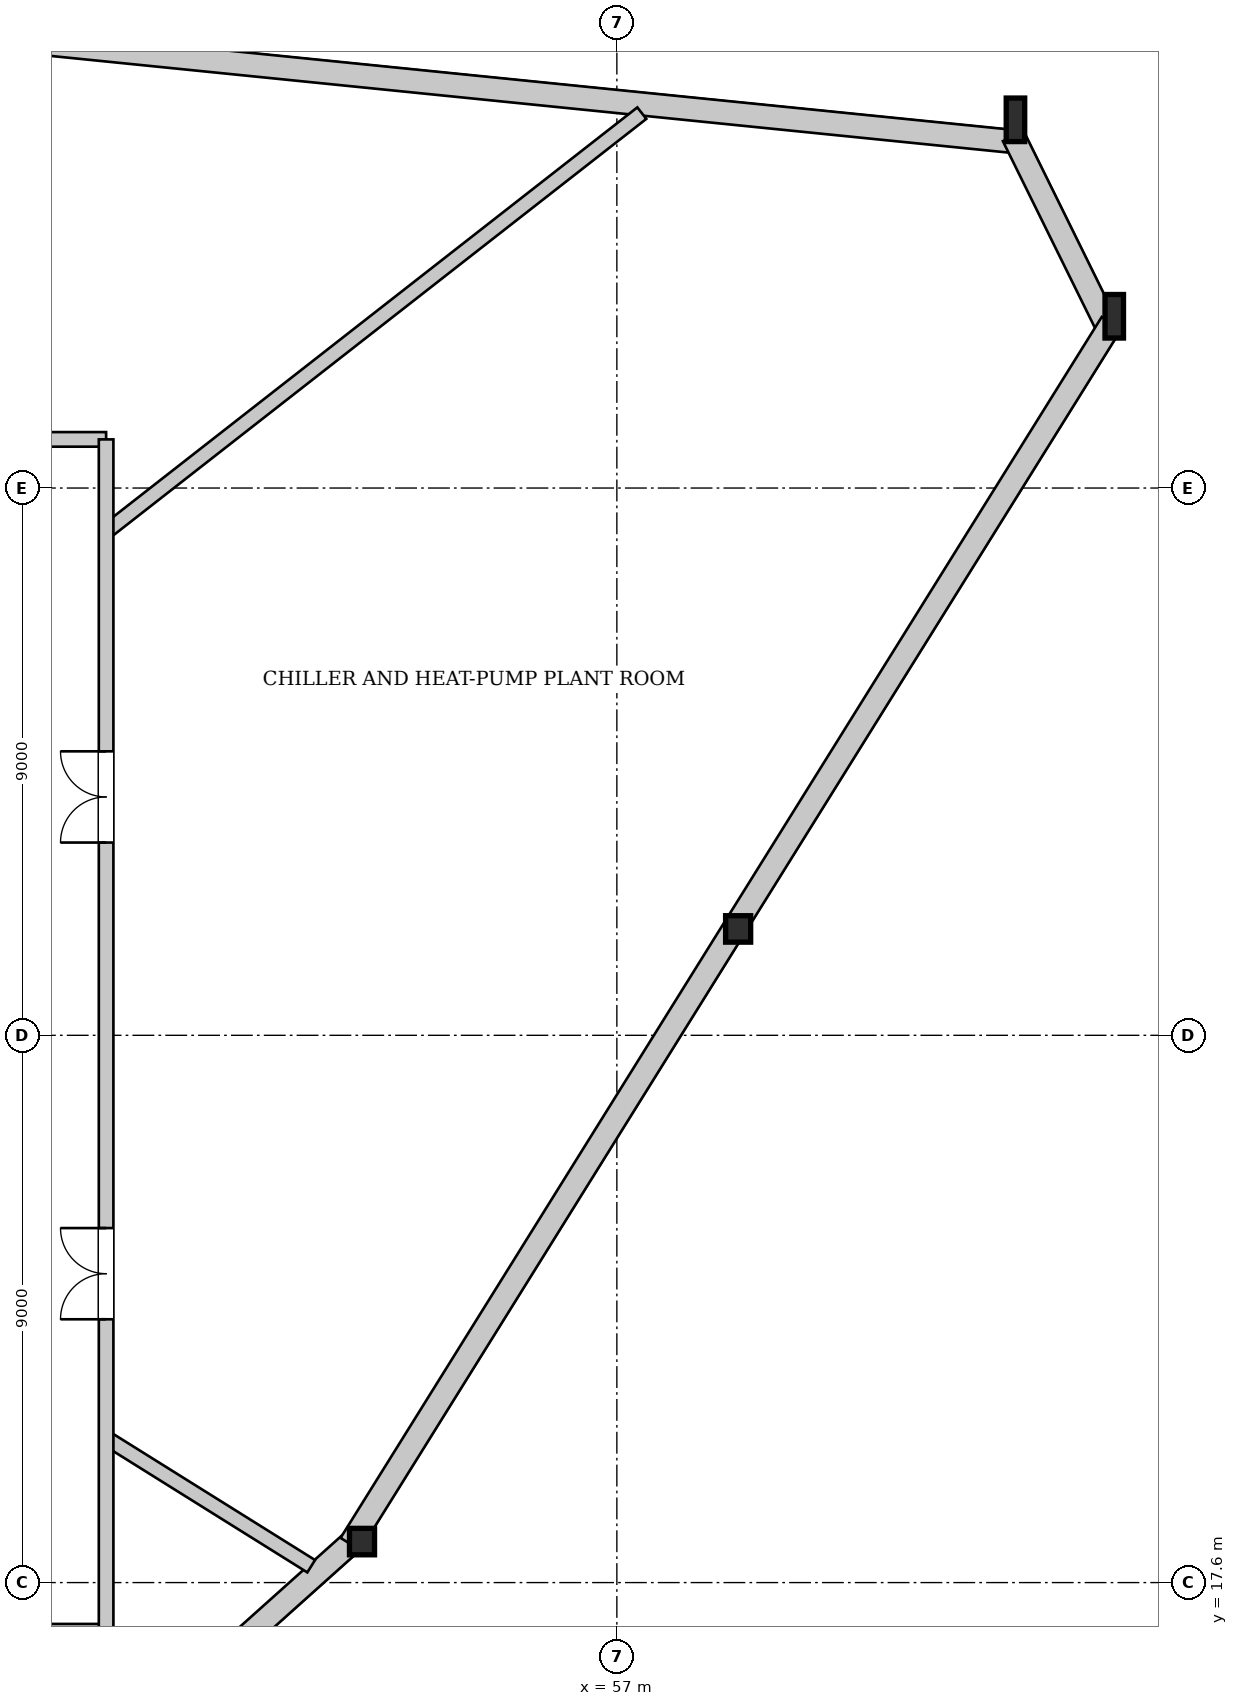
"""IFC4 building model, lengths in metres.
Left out: names, types, materials, properties, quantities, classifications, styles, units other than length and angle.
Written with IfcOpenShell. Run it as: python <this file> out.ifc"""

import sys

from ifc_helpers import new_model, si_unit, direction, frame, frame_2d, origin, origin_2d, place, context, subcontext, project, spatial, rectangle, i_section, extrude, source, transform, mapped, element, fill, save


model = new_model("IFC4")
c1 = context("Model", 3, precision=1e-05, world=origin(), true_north=direction((0.0, 1.0)))
c2 = subcontext(c1, "Body", "Model", "MODEL_VIEW")
j1 = project(units=[si_unit("LENGTHUNIT", "METRE"), si_unit("PLANEANGLEUNIT", "RADIAN")], contexts=[c1])
p1 = place(None, origin())
s1 = spatial("IfcSite", under=j1, at=p1, CompositionType="ELEMENT")
p2 = place(p1, origin())
s2 = spatial("IfcBuilding", under=s1, at=p2, CompositionType="ELEMENT")
p3 = place(p2, frame((0.0, 0.0, 142.1)))
s3 = spatial("IfcBuildingStorey", under=s2, at=p3, CompositionType="ELEMENT", Elevation=142.1)
m1 = source(origin(), c2, "Body", "SweptSolid", [
    extrude(i_section(OverallWidth=0.304, OverallDepth=0.716, WebThickness=0.021, FlangeThickness=0.04, at=origin_2d()), origin(), (0.0, 0.0, 1.0), 4.362),
])
p4 = place(p3, frame((65.297, 38.213, 0.0), z_axis=(-0.053564206709, 0.097221553869, 0.993820328441), x_axis=(-0.875864353367, -0.482557389852, 0.0)))
e1 = element("IfcColumn", 1, at=p4, inside=s3, PredefinedType="COLUMN", context=c2, shape_type="MappedRepresentation", body=[
    mapped(m1, transform((0.0, 0.0, 0.0), x_axis=(1.0, 0.0, 0.0), y_axis=(0.0, 1.0, 0.0), z_axis=(0.0, 0.0, 1.0), scale=1.0)),
])
m2 = source(origin(), c2, "Body", "SweptSolid", [
    extrude(i_section(OverallWidth=0.304, OverallDepth=0.716, WebThickness=0.021, FlangeThickness=0.04, at=origin_2d()), origin(), (0.0, 0.0, 1.0), 4.358),
])
p5 = place(p3, frame((63.689, 41.473, 0.0), z_axis=(-0.061281500187, 0.083519850803, 0.994620034112), x_axis=(-0.806250246525, -0.591574627564, 0.0)))
e2 = element("IfcColumn", 2, at=p5, inside=s3, PredefinedType="COLUMN", context=c2, shape_type="MappedRepresentation", body=[
    mapped(m2, transform((0.0, 0.0, 0.0), x_axis=(1.0, 0.0, 0.0), y_axis=(0.0, 1.0, 0.0), z_axis=(0.0, 0.0, 1.0), scale=1.0)),
])
m3 = source(origin(), c2, "Body", "SweptSolid", [
    extrude(i_section(OverallWidth=0.412, OverallDepth=0.435, WebThickness=0.031, FlangeThickness=0.05, at=origin_2d()), origin(), (0.0, 0.0, 1.0), 4.344),
])
p6 = place(p3, frame((52.779, 18.134, 0.0), z_axis=(0.013824133478, 0.06468120989, 0.997810219641), x_axis=(-0.977914175981, 0.209006852555, 0.0)))
e3 = element("IfcColumn", 3, at=p6, inside=s3, PredefinedType="COLUMN", context=c2, shape_type="MappedRepresentation", body=[
    mapped(m3, transform((0.0, 0.0, 0.0), x_axis=(1.0, 0.0, 0.0), y_axis=(0.0, 1.0, 0.0), z_axis=(0.0, 0.0, 1.0), scale=1.0)),
])
m4 = source(origin(), c2, "Body", "SweptSolid", [
    extrude(i_section(OverallWidth=0.412, OverallDepth=0.435, WebThickness=0.031, FlangeThickness=0.05, at=origin_2d()), origin(), (0.0, 0.0, 1.0), 4.35),
])
p7 = place(p3, frame((59.038, 28.173, 0.0), z_axis=(-0.019923497825, 0.081040931997, 0.996511626413), x_axis=(-0.971084473571, -0.238736141356, 0.0)))
e4 = element("IfcColumn", 4, at=p7, inside=s3, PredefinedType="COLUMN", context=c2, shape_type="MappedRepresentation", body=[
    mapped(m4, transform((0.0, 0.0, 0.0), x_axis=(1.0, 0.0, 0.0), y_axis=(0.0, 1.0, 0.0), z_axis=(0.0, 0.0, 1.0), scale=1.0)),
])
p8 = place(p3, frame((52.652, 18.275, 0.0), z_axis=(0.0, 0.0, 1.0), x_axis=(-0.744998125176, -0.667066558511, 0.0)))
e5 = element("IfcWall", 5, at=p8, inside=s3, PredefinedType="SOLIDWALL", context=c2, shape_type="SweptSolid", body=[
    extrude(rectangle(XDim=23.662, YDim=0.38, at=frame_2d((11.831, 0.0))), origin(), (0.0, 0.0, 1.0), 3.642),
])
p9 = place(p3, frame((40.712, 43.601, 0.0), z_axis=(0.0, 0.0, 1.0), x_axis=(0.994945211236, -0.100419254326, 0.0)))
e6 = element("IfcWall", 6, at=p9, inside=s3, PredefinedType="SOLIDWALL", context=c2, shape_type="SweptSolid", body=[
    extrude(rectangle(XDim=23.075, YDim=0.38, at=frame_2d((11.537, 0.0))), origin(), (0.0, 0.0, 1.0), 3.642),
])
p10 = place(p3, frame((63.519, 41.389, 0.0), z_axis=(0.0, 0.0, 1.0), x_axis=(0.442318381108, -0.896858098995, 0.0)))
e7 = element("IfcWall", 7, at=p10, inside=s3, PredefinedType="SOLIDWALL", context=c2, shape_type="SweptSolid", body=[
    extrude(rectangle(XDim=3.636, YDim=0.38, at=frame_2d((1.818, 0.0))), origin(), (0.0, 0.0, 1.0), 3.642),
])
p11 = place(p3, frame((65.136, 38.313, 0.0), z_axis=(0.0, 0.0, 1.0), x_axis=(-0.529057237664, -0.84858614134, 0.0)))
e8 = element("IfcWall", 8, at=p11, inside=s3, PredefinedType="SOLIDWALL", context=c2, shape_type="SweptSolid", body=[
    extrude(rectangle(XDim=23.662, YDim=0.38, at=frame_2d((11.831, 0.0))), origin(), (0.0, 0.0, 1.0), 3.642),
])
p12 = place(p3, frame((48.6, 19.976, 0.0), z_axis=(0.0, 0.0, 1.0), x_axis=(0.84806382316, -0.529894094935, 0.0)))
e9 = element("IfcWall", 9, at=p12, inside=s3, PredefinedType="PARTITIONING", context=c2, shape_type="SweptSolid", body=[
    extrude(rectangle(XDim=3.977, YDim=0.24, at=frame_2d((1.989, 0.0))), origin(), (0.0, 0.0, 1.0), 4.25),
])
p13 = place(p3, frame((48.6, 34.882, 0.0), z_axis=(0.0, 0.0, 1.0), x_axis=(0.788011131686, 0.615660991406, 0.0)))
e10 = element("IfcWall", 10, at=p13, inside=s3, PredefinedType="PARTITIONING", context=c2, shape_type="SweptSolid", body=[
    extrude(rectangle(XDim=11.181, YDim=0.24, at=frame_2d((5.59, 0.0))), origin(), (0.0, 0.0, 1.0), 4.25),
])
p14 = place(p3, frame((27.4, 16.8, 0.0), z_axis=(0.0, 0.0, 1.0), x_axis=(1.0, 0.0, 0.0)))
e11 = element("IfcWall", 11, at=p14, inside=s3, PredefinedType="PARTITIONING", context=c2, shape_type="SweptSolid", body=[
    extrude(rectangle(XDim=21.2, YDim=0.24, at=frame_2d((10.6, 0.0))), origin(), (0.0, 0.0, 1.0), 4.25),
])
p15 = place(p14, frame((5.7, 0.0, 0.0)))
e12 = element("IfcOpeningElement", 12, at=p15, cuts=e11, PredefinedType="OPENING", context=c2, shape_type="SweptSolid", body=[
    extrude(rectangle(XDim=1.32, YDim=2.2, at=frame_2d((0.66, 1.1))), frame((0.0, 0.13, 0.0), z_axis=(0.0, -1.0, 0.0), x_axis=(1.0, 0.0, 0.0)), (0.0, 0.0, 1.0), 0.26),
])
p16 = place(p14, frame((14.18, 0.0, 0.0)))
e13 = element("IfcOpeningElement", 13, at=p16, cuts=e11, PredefinedType="OPENING", context=c2, shape_type="SweptSolid", body=[
    extrude(rectangle(XDim=1.5, YDim=2.25, at=frame_2d((0.75, 1.125))), frame((0.0, 0.13, 0.0), z_axis=(0.0, -1.0, 0.0), x_axis=(1.0, 0.0, 0.0)), (0.0, 0.0, 1.0), 0.26),
])
p17 = place(p3, frame((27.4, 36.4, 0.0), z_axis=(0.0, 0.0, 1.0), x_axis=(1.0, 0.0, 0.0)))
e14 = element("IfcWall", 14, at=p17, inside=s3, PredefinedType="PARTITIONING", context=c2, shape_type="SweptSolid", body=[
    extrude(rectangle(XDim=21.2, YDim=0.24, at=frame_2d((10.6, 0.0))), origin(), (0.0, 0.0, 1.0), 4.25),
])
p18 = place(p17, frame((4.81, 0.0, 0.0)))
e15 = element("IfcOpeningElement", 15, at=p18, cuts=e14, PredefinedType="OPENING", context=c2, shape_type="SweptSolid", body=[
    extrude(rectangle(XDim=1.5, YDim=2.25, at=frame_2d((0.75, 1.125))), frame((0.0, 0.13, 0.0), z_axis=(0.0, -1.0, 0.0), x_axis=(1.0, 0.0, 0.0)), (0.0, 0.0, 1.0), 0.26),
])
p19 = place(p17, frame((14.09, 0.0, 0.0)))
e16 = element("IfcOpeningElement", 16, at=p19, cuts=e14, PredefinedType="OPENING", context=c2, shape_type="SweptSolid", body=[
    extrude(rectangle(XDim=1.5, YDim=2.25, at=frame_2d((0.75, 1.125))), frame((0.0, 0.13, 0.0), z_axis=(0.0, -1.0, 0.0), x_axis=(1.0, 0.0, 0.0)), (0.0, 0.0, 1.0), 0.26),
])
p20 = place(p3, frame((48.6, 16.8, 0.0), z_axis=(0.0, 0.0, 1.0), x_axis=(0.0, 1.0, 0.0)))
e17 = element("IfcWall", 17, at=p20, inside=s3, PredefinedType="PARTITIONING", context=c2, shape_type="SweptSolid", body=[
    extrude(rectangle(XDim=19.6, YDim=0.24, at=frame_2d((9.8, 0.0))), origin(), (0.0, 0.0, 1.0), 4.25),
])
p21 = place(p20, frame((5.13, 0.0, 0.0)))
e18 = element("IfcOpeningElement", 18, at=p21, cuts=e17, PredefinedType="OPENING", context=c2, shape_type="SweptSolid", body=[
    extrude(rectangle(XDim=1.5, YDim=2.25, at=frame_2d((0.75, 1.125))), frame((0.0, 0.13, 0.0), z_axis=(0.0, -1.0, 0.0), x_axis=(1.0, 0.0, 0.0)), (0.0, 0.0, 1.0), 0.26),
])
p22 = place(p20, frame((12.97, 0.0, 0.0)))
e19 = element("IfcOpeningElement", 19, at=p22, cuts=e17, PredefinedType="OPENING", context=c2, shape_type="SweptSolid", body=[
    extrude(rectangle(XDim=1.5, YDim=2.25, at=frame_2d((0.75, 1.125))), frame((0.0, 0.13, 0.0), z_axis=(0.0, -1.0, 0.0), x_axis=(1.0, 0.0, 0.0)), (0.0, 0.0, 1.0), 0.26),
])
m5 = source(origin(), c2, "Body", "SweptSolid", [
    extrude(rectangle(XDim=1.5, YDim=2.25, at=frame_2d((0.75, 1.125))), frame((0.0, 0.025, 0.0), z_axis=(0.0, -1.0, 0.0), x_axis=(1.0, 0.0, 0.0)), (0.0, 0.0, 1.0), 0.05),
])
p23 = place(p21, origin())
e20 = element("IfcDoor", 20, at=p23, inside=s3, OperationType="DOUBLE_DOOR_SINGLE_SWING", PredefinedType="DOOR", context=c2, shape_type="MappedRepresentation", body=[
    mapped(m5, transform((0.0, 0.0, 0.0), x_axis=(1.0, 0.0, 0.0), y_axis=(0.0, 1.0, 0.0), z_axis=(0.0, 0.0, 1.0), scale=1.0)),
])
fill(e18, e20)
p24 = place(p22, origin())
e21 = element("IfcDoor", 21, at=p24, inside=s3, OperationType="DOUBLE_DOOR_SINGLE_SWING", PredefinedType="DOOR", context=c2, shape_type="MappedRepresentation", body=[
    mapped(m5, transform((0.0, 0.0, 0.0), x_axis=(1.0, 0.0, 0.0), y_axis=(0.0, 1.0, 0.0), z_axis=(0.0, 0.0, 1.0), scale=1.0)),
])
fill(e19, e21)
save(model, sys.argv[1])
